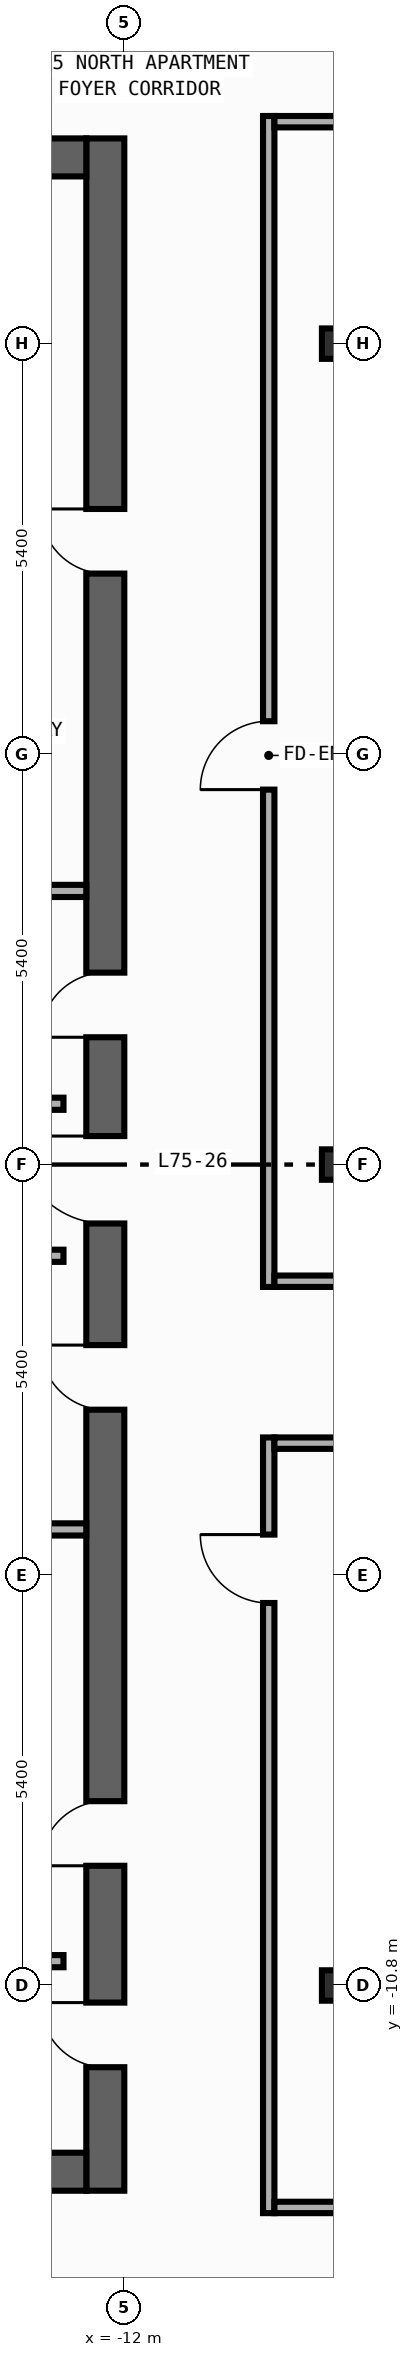
"""IFC4 building model, lengths in metres.
Left out: names, types, materials, properties, quantities, classifications, styles, units other than length and angle.
Written with IfcOpenShell. Run it as: python <this file> out.ifc"""

import sys

from ifc_helpers import new_model, si_unit, direction, frame, frame_2d, origin, origin_2d, place, context, subcontext, project, spatial, rectangle, i_section, extrude, element, fill, save


model = new_model("IFC4")
c1 = context("Model", 3, precision=1e-05, world=origin(), true_north=direction((0.0, 1.0)))
c2 = subcontext(c1, "Body", "Model", "MODEL_VIEW")
j1 = project(units=[si_unit("LENGTHUNIT", "METRE"), si_unit("PLANEANGLEUNIT", "RADIAN")], contexts=[c1])
p1 = place(None, origin())
s1 = spatial("IfcSite", under=j1, at=p1, CompositionType="ELEMENT")
p2 = place(p1, origin())
s2 = spatial("IfcBuilding", under=s1, at=p2, CompositionType="ELEMENT")
p3 = place(p2, frame((0.0, 0.0, 311.8)))
s3 = spatial("IfcBuildingStorey", under=s2, at=p3, CompositionType="ELEMENT", Elevation=311.8)
p4 = place(p3, frame((-12.25, -13.5, 0.0), z_axis=(0.0, 0.0, 1.0), x_axis=(0.0, 1.0, 0.0)))
e1 = element("IfcWall", 1, at=p4, inside=s3, PredefinedType="SHEAR", context=c2, shape_type="SweptSolid", body=[
    extrude(rectangle(XDim=27.0, YDim=0.5, at=frame_2d((13.5, 0.0))), origin(), (0.0, 0.0, 1.0), 3.54),
])
p5 = place(p4, frame((15.175, 0.0, 0.0)))
e2 = element("IfcOpeningElement", 2, at=p5, cuts=e1, PredefinedType="OPENING", context=c2, shape_type="SweptSolid", body=[
    extrude(rectangle(XDim=0.85, YDim=2.1, at=frame_2d((0.425, 1.05))), frame((0.0, 0.26, 0.0), z_axis=(0.0, -1.0, 0.0), x_axis=(1.0, 0.0, 0.0)), (0.0, 0.0, 1.0), 0.52),
])
p6 = place(p4, frame((21.275, 0.0, 0.0)))
e3 = element("IfcOpeningElement", 3, at=p6, cuts=e1, PredefinedType="OPENING", context=c2, shape_type="SweptSolid", body=[
    extrude(rectangle(XDim=0.85, YDim=2.1, at=frame_2d((0.425, 1.05))), frame((0.0, 0.26, 0.0), z_axis=(0.0, -1.0, 0.0), x_axis=(1.0, 0.0, 0.0)), (0.0, 0.0, 1.0), 0.52),
])
p7 = place(p4, frame((4.275, 0.0, 0.0)))
e4 = element("IfcOpeningElement", 4, at=p7, cuts=e1, PredefinedType="OPENING", context=c2, shape_type="SweptSolid", body=[
    extrude(rectangle(XDim=0.85, YDim=2.1, at=frame_2d((0.425, 1.05))), frame((0.0, 0.26, 0.0), z_axis=(0.0, -1.0, 0.0), x_axis=(1.0, 0.0, 0.0)), (0.0, 0.0, 1.0), 0.52),
])
p8 = place(p4, frame((10.275, 0.0, 0.0)))
e5 = element("IfcOpeningElement", 5, at=p8, cuts=e1, PredefinedType="OPENING", context=c2, shape_type="SweptSolid", body=[
    extrude(rectangle(XDim=0.85, YDim=2.1, at=frame_2d((0.425, 1.05))), frame((0.0, 0.26, 0.0), z_axis=(0.0, -1.0, 0.0), x_axis=(1.0, 0.0, 0.0)), (0.0, 0.0, 1.0), 0.52),
])
p9 = place(p4, frame((12.725, 0.0, 0.0)))
e6 = element("IfcOpeningElement", 6, at=p9, cuts=e1, PredefinedType="OPENING", context=c2, shape_type="SweptSolid", body=[
    extrude(rectangle(XDim=1.15, YDim=2.2, at=frame_2d((0.575, 1.1))), frame((0.0, 0.26, 0.0), z_axis=(0.0, -1.0, 0.0), x_axis=(1.0, 0.0, 0.0)), (0.0, 0.0, 1.0), 0.52),
])
p10 = place(p4, frame((1.625, 0.0, 0.0)))
e7 = element("IfcOpeningElement", 7, at=p10, cuts=e1, PredefinedType="OPENING", context=c2, shape_type="SweptSolid", body=[
    extrude(rectangle(XDim=0.85, YDim=2.1, at=frame_2d((0.425, 1.05))), frame((0.0, 0.26, 0.0), z_axis=(0.0, -1.0, 0.0), x_axis=(1.0, 0.0, 0.0)), (0.0, 0.0, 1.0), 0.52),
])
for number, where, z_axis, x_axis in (
    (8, (-19.9, -13.25, 0.0), (0.0, 0.0, 1.0), (1.0, 0.0, 0.0)),
    (9, (-19.9, 13.25, 0.0), (0.0, 0.0, 1.0), (1.0, 0.0, 0.0)),
):
    element("IfcWall", number, at=place(p3, frame(where, z_axis=z_axis, x_axis=x_axis)), inside=s3, PredefinedType="SHEAR", context=c2, shape_type="SweptSolid", body=[
        extrude(rectangle(XDim=7.4, YDim=0.5, at=frame_2d((3.7, 0.0))), origin(), (0.0, 0.0, 1.0), 3.54),
    ])
for number, where, z_axis, x_axis in (
    (10, (-9.2, -10.8, 0.0), (0.0, 0.0, 1.0), (1.0, 0.0, 0.0)),
    (11, (-9.2, 0.0, 0.0), (0.0, 0.0, 1.0), (1.0, 0.0, 0.0)),
    (12, (-9.2, 10.8, 0.0), (0.0, 0.0, 1.0), (1.0, 0.0, 0.0)),
):
    element("IfcColumn", number, at=place(p3, frame(where, z_axis=z_axis, x_axis=x_axis)), inside=s3, PredefinedType="COLUMN", context=c2, shape_type="SweptSolid", body=[
        extrude(i_section(OverallWidth=0.4, OverallDepth=0.4, WebThickness=0.013, FlangeThickness=0.021, FilletRadius=0.022, at=origin_2d()), origin(), (0.0, 0.0, 1.0), 3.8),
    ])
for number, where, z_axis, x_axis in (
    (13, (-15.4, 0.8, 0.0), (0.0, 0.0, 1.0), (1.0, 0.0, 0.0)),
    (14, (-15.4, -1.2, 0.0), (0.0, 0.0, 1.0), (1.0, 0.0, 0.0)),
    (15, (-15.4, -10.48, 0.0), (0.0, 0.0, 1.0), (1.0, 0.0, 0.0)),
):
    element("IfcWall", number, at=place(p3, frame(where, z_axis=z_axis, x_axis=x_axis)), inside=s3, PredefinedType="STANDARD", context=c2, shape_type="SweptSolid", body=[
        extrude(rectangle(XDim=2.6, YDim=0.16, at=frame_2d((1.3, 0.0))), origin(), (0.0, 0.0, 1.0), 3.54),
    ])
for number, where, z_axis, x_axis in (
    (16, (-15.4, 3.6, 0.0), (0.0, 0.0, 1.0), (1.0, 0.0, 0.0)),
    (17, (-15.4, -4.8, 0.0), (0.0, 0.0, 1.0), (1.0, 0.0, 0.0)),
):
    element("IfcWall", number, at=place(p3, frame(where, z_axis=z_axis, x_axis=x_axis)), inside=s3, PredefinedType="PARTITIONING", context=c2, shape_type="SweptSolid", body=[
        extrude(rectangle(XDim=2.9, YDim=0.16, at=frame_2d((1.45, 0.0))), origin(), (0.0, 0.0, 1.0), 3.54),
    ])
p11 = place(p3, frame((-10.1, -1.61, 0.0), z_axis=(0.0, 0.0, 1.0), x_axis=(0.0, 1.0, 0.0)))
e18 = element("IfcWall", 18, at=p11, inside=s3, PredefinedType="PARTITIONING", context=c2, shape_type="SweptSolid", body=[
    extrude(rectangle(XDim=15.405, YDim=0.15, at=frame_2d((7.703, 0.0))), origin(), (0.0, 0.0, 1.0), 3.54),
])
p12 = place(p11, frame((6.543, 0.0, 0.0)))
e19 = element("IfcOpeningElement", 19, at=p12, cuts=e18, PredefinedType="OPENING", context=c2, shape_type="SweptSolid", body=[
    extrude(rectangle(XDim=0.9, YDim=2.15, at=frame_2d((0.45, 1.075))), frame((0.0, 0.085, 0.0), z_axis=(0.0, -1.0, 0.0), x_axis=(1.0, 0.0, 0.0)), (0.0, 0.0, 1.0), 0.17),
])
p13 = place(p3, frame((-10.1, -13.795, 0.0), z_axis=(0.0, 0.0, 1.0), x_axis=(0.0, 1.0, 0.0)))
e20 = element("IfcWall", 20, at=p13, inside=s3, PredefinedType="PARTITIONING", context=c2, shape_type="SweptSolid", body=[
    extrude(rectangle(XDim=10.205, YDim=0.15, at=frame_2d((5.103, 0.0))), origin(), (0.0, 0.0, 1.0), 3.54),
])
p14 = place(p13, frame((8.027, 0.0, 0.0)))
e21 = element("IfcOpeningElement", 21, at=p14, cuts=e20, PredefinedType="OPENING", context=c2, shape_type="SweptSolid", body=[
    extrude(rectangle(XDim=0.9, YDim=2.15, at=frame_2d((0.45, 1.075))), frame((0.0, 0.085, 0.0), z_axis=(0.0, -1.0, 0.0), x_axis=(1.0, 0.0, 0.0)), (0.0, 0.0, 1.0), 0.17),
])
p15 = place(p3, frame((-10.025, -1.535, 0.0), z_axis=(0.0, 0.0, 1.0), x_axis=(1.0, 0.0, 0.0)))
e22 = element("IfcWall", 22, at=p15, inside=s3, PredefinedType="PARTITIONING", context=c2, shape_type="SweptSolid", body=[
    extrude(rectangle(XDim=6.235, YDim=0.15, at=frame_2d((3.117, 0.0))), origin(), (0.0, 0.0, 1.0), 3.54),
])
p16 = place(p15, frame((4.875, 0.0, 0.0)))
e23 = element("IfcOpeningElement", 23, at=p16, cuts=e22, PredefinedType="OPENING", context=c2, shape_type="SweptSolid", body=[
    extrude(rectangle(XDim=0.9, YDim=2.15, at=frame_2d((0.45, 1.075))), frame((0.0, 0.085, 0.0), z_axis=(0.0, -1.0, 0.0), x_axis=(1.0, 0.0, 0.0)), (0.0, 0.0, 1.0), 0.17),
])
p17 = place(p3, frame((-10.025, -3.665, 0.0), z_axis=(0.0, 0.0, 1.0), x_axis=(1.0, 0.0, 0.0)))
e24 = element("IfcWall", 24, at=p17, inside=s3, PredefinedType="PARTITIONING", context=c2, shape_type="SweptSolid", body=[
    extrude(rectangle(XDim=6.255, YDim=0.15, at=frame_2d((3.127, 0.0))), origin(), (0.0, 0.0, 1.0), 3.54),
])
p18 = place(p17, frame((4.895, 0.0, 0.0)))
e25 = element("IfcOpeningElement", 25, at=p18, cuts=e24, PredefinedType="OPENING", context=c2, shape_type="SweptSolid", body=[
    extrude(rectangle(XDim=0.9, YDim=2.15, at=frame_2d((0.45, 1.075))), frame((0.0, 0.085, 0.0), z_axis=(0.0, -1.0, 0.0), x_axis=(1.0, 0.0, 0.0)), (0.0, 0.0, 1.0), 0.17),
])
p19 = place(p3, frame((-10.025, 13.72, 0.0), z_axis=(0.0, 0.0, 1.0), x_axis=(1.0, 0.0, 0.0)))
e26 = element("IfcWall", 26, at=p19, inside=s3, PredefinedType="PARTITIONING", context=c2, shape_type="SweptSolid", body=[
    extrude(rectangle(XDim=6.085, YDim=0.15, at=frame_2d((3.042, 0.0))), origin(), (0.0, 0.0, 1.0), 3.54),
])
p20 = place(p19, frame((4.116, 0.0, 0.0)))
e27 = element("IfcOpeningElement", 27, at=p20, cuts=e26, PredefinedType="OPENING", context=c2, shape_type="SweptSolid", body=[
    extrude(rectangle(XDim=0.9, YDim=2.15, at=frame_2d((0.45, 1.075))), frame((0.0, 0.085, 0.0), z_axis=(0.0, -1.0, 0.0), x_axis=(1.0, 0.0, 0.0)), (0.0, 0.0, 1.0), 0.17),
])
p21 = place(p3, frame((-10.025, -13.72, 0.0), z_axis=(0.0, 0.0, 1.0), x_axis=(1.0, 0.0, 0.0)))
e28 = element("IfcWall", 28, at=p21, inside=s3, PredefinedType="PARTITIONING", context=c2, shape_type="SweptSolid", body=[
    extrude(rectangle(XDim=6.255, YDim=0.15, at=frame_2d((3.127, 0.0))), origin(), (0.0, 0.0, 1.0), 3.54),
])
p22 = place(p21, frame((4.089, 0.0, 0.0)))
e29 = element("IfcOpeningElement", 29, at=p22, cuts=e28, PredefinedType="OPENING", context=c2, shape_type="SweptSolid", body=[
    extrude(rectangle(XDim=0.9, YDim=2.15, at=frame_2d((0.45, 1.075))), frame((0.0, 0.085, 0.0), z_axis=(0.0, -1.0, 0.0), x_axis=(1.0, 0.0, 0.0)), (0.0, 0.0, 1.0), 0.17),
])
p23 = place(p5, origin())
e30 = element("IfcDoor", 30, at=p23, inside=s3, OperationType="SINGLE_SWING_LEFT", PredefinedType="DOOR", context=c2, shape_type="SweptSolid", body=[
    extrude(rectangle(XDim=0.85, YDim=2.1, at=frame_2d((0.425, 1.05))), frame((0.0, 0.025, 0.0), z_axis=(0.0, -1.0, 0.0), x_axis=(1.0, 0.0, 0.0)), (0.0, 0.0, 1.0), 0.05),
])
fill(e2, e30)
p24 = place(p6, origin())
e31 = element("IfcDoor", 31, at=p24, inside=s3, OperationType="SINGLE_SWING_RIGHT", PredefinedType="DOOR", context=c2, shape_type="SweptSolid", body=[
    extrude(rectangle(XDim=0.85, YDim=2.1, at=frame_2d((0.425, 1.05))), frame((0.0, 0.025, 0.0), z_axis=(0.0, -1.0, 0.0), x_axis=(1.0, 0.0, 0.0)), (0.0, 0.0, 1.0), 0.05),
])
fill(e3, e31)
p25 = place(p7, origin())
e32 = element("IfcDoor", 32, at=p25, inside=s3, OperationType="SINGLE_SWING_LEFT", PredefinedType="DOOR", context=c2, shape_type="SweptSolid", body=[
    extrude(rectangle(XDim=0.85, YDim=2.1, at=frame_2d((0.425, 1.05))), frame((0.0, 0.025, 0.0), z_axis=(0.0, -1.0, 0.0), x_axis=(1.0, 0.0, 0.0)), (0.0, 0.0, 1.0), 0.05),
])
fill(e4, e32)
p26 = place(p8, origin())
e33 = element("IfcDoor", 33, at=p26, inside=s3, OperationType="SINGLE_SWING_RIGHT", PredefinedType="DOOR", context=c2, shape_type="SweptSolid", body=[
    extrude(rectangle(XDim=0.85, YDim=2.1, at=frame_2d((0.425, 1.05))), frame((0.0, 0.025, 0.0), z_axis=(0.0, -1.0, 0.0), x_axis=(1.0, 0.0, 0.0)), (0.0, 0.0, 1.0), 0.05),
])
fill(e5, e33)
p27 = place(p9, origin())
e34 = element("IfcDoor", 34, at=p27, inside=s3, OperationType="SINGLE_SWING_RIGHT", PredefinedType="DOOR", context=c2, shape_type="SweptSolid", body=[
    extrude(rectangle(XDim=1.15, YDim=2.2, at=frame_2d((0.575, 1.1))), frame((0.0, 0.025, 0.0), z_axis=(0.0, -1.0, 0.0), x_axis=(1.0, 0.0, 0.0)), (0.0, 0.0, 1.0), 0.05),
])
fill(e6, e34)
p28 = place(p10, origin())
e35 = element("IfcDoor", 35, at=p28, inside=s3, OperationType="SINGLE_SWING_RIGHT", PredefinedType="DOOR", context=c2, shape_type="SweptSolid", body=[
    extrude(rectangle(XDim=0.85, YDim=2.1, at=frame_2d((0.425, 1.05))), frame((0.0, 0.025, 0.0), z_axis=(0.0, -1.0, 0.0), x_axis=(1.0, 0.0, 0.0)), (0.0, 0.0, 1.0), 0.05),
])
fill(e7, e35)
p29 = place(p12, origin())
e36 = element("IfcDoor", 36, at=p29, inside=s3, OperationType="SINGLE_SWING_LEFT", PredefinedType="DOOR", context=c2, shape_type="SweptSolid", body=[
    extrude(rectangle(XDim=0.9, YDim=2.15, at=frame_2d((0.45, 1.075))), frame((0.0, 0.025, 0.0), z_axis=(0.0, -1.0, 0.0), x_axis=(1.0, 0.0, 0.0)), (0.0, 0.0, 1.0), 0.05),
])
fill(e19, e36)
p30 = place(p14, origin())
e37 = element("IfcDoor", 37, at=p30, inside=s3, OperationType="SINGLE_SWING_RIGHT", PredefinedType="DOOR", context=c2, shape_type="SweptSolid", body=[
    extrude(rectangle(XDim=0.9, YDim=2.15, at=frame_2d((0.45, 1.075))), frame((0.0, 0.025, 0.0), z_axis=(0.0, -1.0, 0.0), x_axis=(1.0, 0.0, 0.0)), (0.0, 0.0, 1.0), 0.05),
])
fill(e21, e37)
save(model, sys.argv[1])
